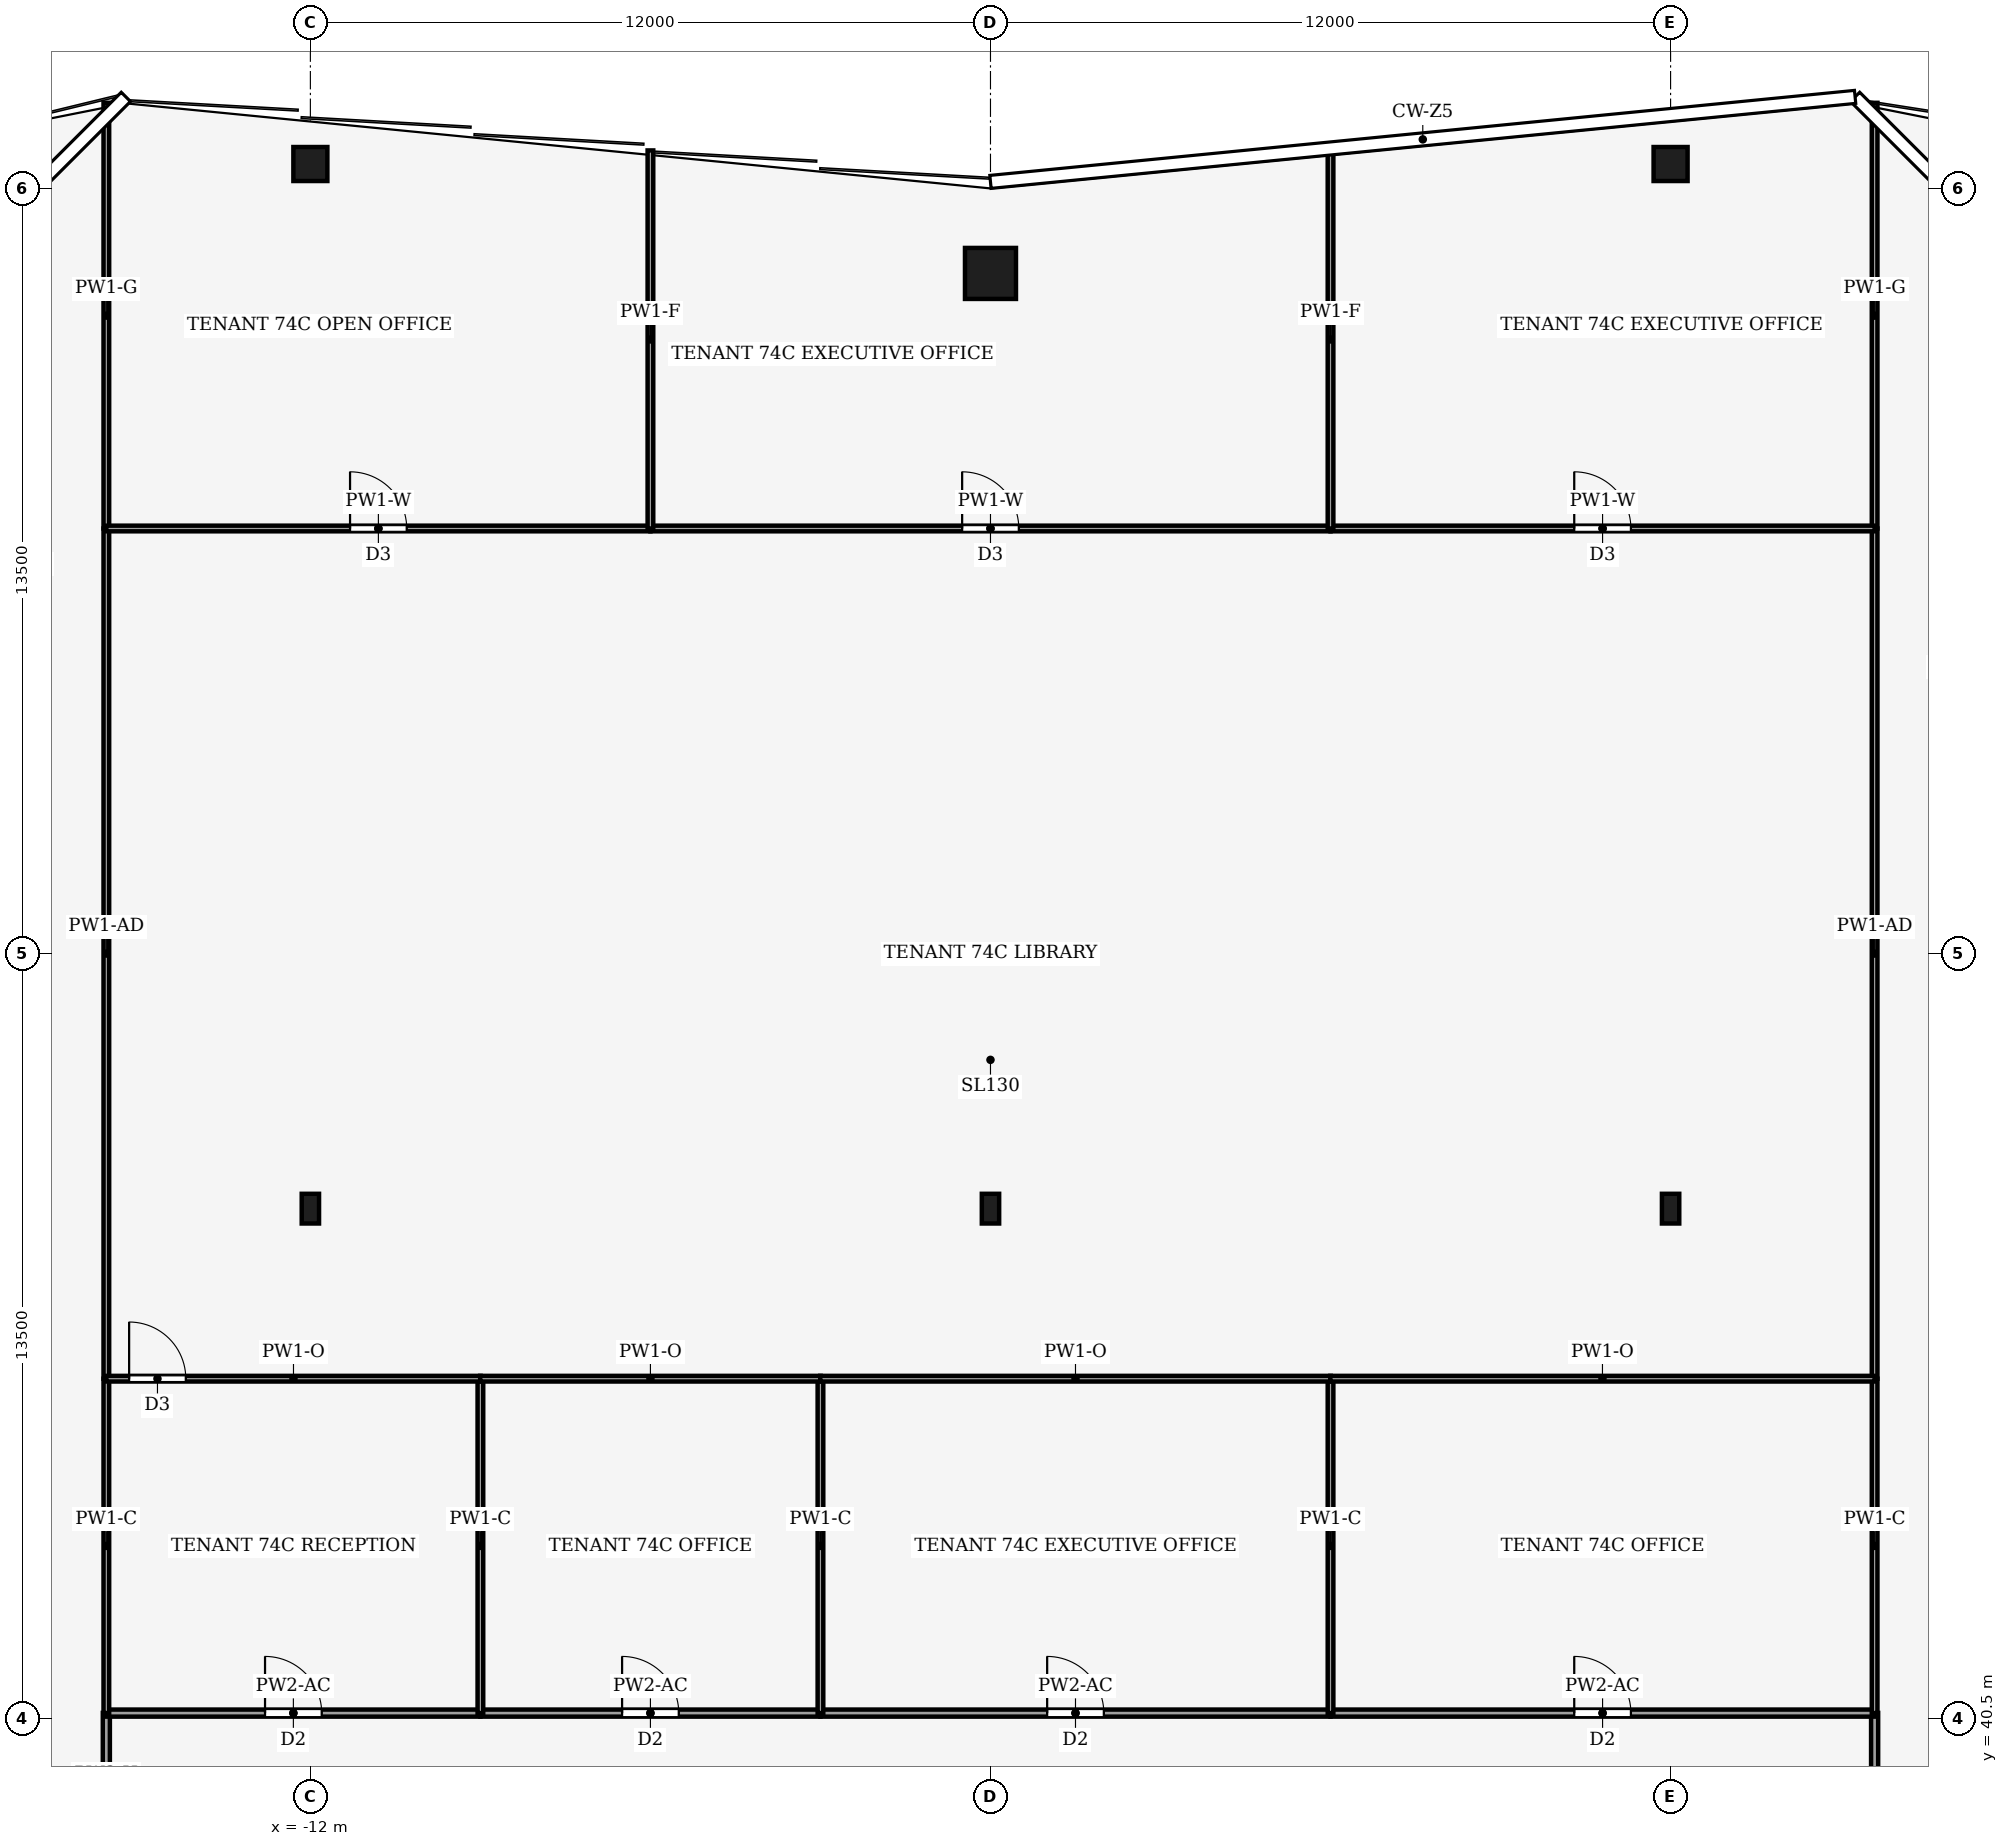
"""IFC4 building model, lengths in metres.
Left out: names, types, materials, properties, quantities, classifications, styles, units other than length and angle.
Written with IfcOpenShell. Run it as: python <this file> out.ifc"""

import sys

from ifc_helpers import new_model, si_unit, direction, frame, frame_2d, origin, origin_2d, place, context, subcontext, project, spatial, rectangle, hollow_rectangle, i_section, extrude, element, fill, save


model = new_model("IFC4")
c1 = context("Model", 3, precision=1e-05, world=origin(), true_north=direction((0.0, 1.0)))
c2 = subcontext(c1, "Body", "Model", "MODEL_VIEW")
j1 = project(units=[si_unit("LENGTHUNIT", "METRE"), si_unit("PLANEANGLEUNIT", "RADIAN")], contexts=[c1])
p1 = place(None, origin())
s1 = spatial("IfcSite", under=j1, at=p1, CompositionType="ELEMENT")
p2 = place(p1, origin())
s2 = spatial("IfcBuilding", under=s1, at=p2, CompositionType="ELEMENT")
p3 = place(p2, frame((0.0, 0.0, 322.0)))
s3 = spatial("IfcBuildingStorey", under=s2, at=p3, CompositionType="ELEMENT", Elevation=322.0)
p4 = place(p3, frame((0.0, 66.0, 0.0), z_axis=(0.0, 0.0, 1.0), x_axis=(1.0, 0.0, 0.0)))
e1 = element("IfcColumn", 1, at=p4, inside=s3, PredefinedType="COLUMN", context=c2, shape_type="SweptSolid", body=[
    extrude(hollow_rectangle(XDim=0.9, YDim=0.9, WallThickness=0.04, at=origin_2d()), origin(), (0.0, 0.0, 1.0), 4.0),
])
for number, where, z_axis, x_axis in (
    (2, (-12.0, 67.93, 0.0), (0.0, 0.0, 1.0), (1.0, 0.0, 0.0)),
    (3, (12.0, 67.93, 0.0), (0.0, 0.0, 1.0), (1.0, 0.0, 0.0)),
):
    element("IfcColumn", number, at=place(p3, frame(where, z_axis=z_axis, x_axis=x_axis)), inside=s3, PredefinedType="COLUMN", context=c2, shape_type="SweptSolid", body=[
        extrude(hollow_rectangle(XDim=0.6, YDim=0.6, WallThickness=0.025, at=origin_2d()), origin(), (0.0, 0.0, 1.0), 4.0),
    ])
for number, where, z_axis, x_axis in (
    (4, (-12.0, 49.5, 0.0), (0.0, 0.0, 1.0), (1.0, 0.0, 0.0)),
    (5, (0.0, 49.5, 0.0), (0.0, 0.0, 1.0), (1.0, 0.0, 0.0)),
    (6, (12.0, 49.5, 0.0), (0.0, 0.0, 1.0), (1.0, 0.0, 0.0)),
):
    element("IfcColumn", number, at=place(p3, frame(where, z_axis=z_axis, x_axis=x_axis)), inside=s3, PredefinedType="COLUMN", context=c2, shape_type="SweptSolid", body=[
        extrude(i_section(OverallWidth=0.306, OverallDepth=0.524, WebThickness=0.012, FlangeThickness=0.04, FilletRadius=0.027, at=origin_2d()), origin(), (0.0, 0.0, 1.0), 4.0),
    ])
p5 = place(p3, frame((-15.6, 37.5, 0.0), z_axis=(0.0, 0.0, 1.0), x_axis=(0.0, 1.0, 0.0)))
e7 = element("IfcWall", 7, at=p5, inside=s3, PredefinedType="PARTITIONING", context=c2, shape_type="SweptSolid", body=[
    extrude(rectangle(XDim=3.104, YDim=0.125, at=frame_2d((1.552, 0.0))), origin(), (0.0, 0.0, 1.0), 3.14),
])
p6 = place(p5, frame((0.252, 0.0, 0.0)))
e8 = element("IfcOpeningElement", 8, at=p6, cuts=e7, PredefinedType="OPENING", context=c2, shape_type="SweptSolid", body=[
    extrude(rectangle(XDim=1.0, YDim=2.1, at=frame_2d((0.5, 1.05))), frame((0.0, 0.073, 0.0), z_axis=(0.0, -1.0, 0.0), x_axis=(1.0, 0.0, 0.0)), (0.0, 0.0, 1.0), 0.145),
])
p7 = place(p3, frame((15.6, 40.604, 0.0), z_axis=(0.0, 0.0, 1.0), x_axis=(0.0, -1.0, 0.0)))
e9 = element("IfcWall", 9, at=p7, inside=s3, PredefinedType="PARTITIONING", context=c2, shape_type="SweptSolid", body=[
    extrude(rectangle(XDim=9.104, YDim=0.125, at=frame_2d((4.552, 0.0))), origin(), (0.0, 0.0, 1.0), 3.14),
])
p8 = place(p7, frame((4.052, 0.0, 0.0)))
e10 = element("IfcOpeningElement", 10, at=p8, cuts=e9, PredefinedType="OPENING", context=c2, shape_type="SweptSolid", body=[
    extrude(rectangle(XDim=1.0, YDim=2.1, at=frame_2d((0.5, 1.05))), frame((0.0, 0.073, 0.0), z_axis=(0.0, -1.0, 0.0), x_axis=(1.0, 0.0, 0.0)), (0.0, 0.0, 1.0), 0.145),
])
p9 = place(p3, frame((-15.6, 40.6, 0.0), z_axis=(0.0, 0.0, 1.0), x_axis=(1.0, 0.0, 0.0)))
e11 = element("IfcWall", 11, at=p9, inside=s3, PredefinedType="PARTITIONING", context=c2, shape_type="SweptSolid", body=[
    extrude(rectangle(XDim=6.6, YDim=0.125, at=frame_2d((3.3, 0.0))), origin(), (0.0, 0.0, 1.0), 3.39),
])
p10 = place(p9, frame((2.8, 0.0, 0.0)))
e12 = element("IfcOpeningElement", 12, at=p10, cuts=e11, PredefinedType="OPENING", context=c2, shape_type="SweptSolid", body=[
    extrude(rectangle(XDim=1.0, YDim=2.1, at=frame_2d((0.5, 1.05))), frame((0.0, 0.073, 0.0), z_axis=(0.0, -1.0, 0.0), x_axis=(1.0, 0.0, 0.0)), (0.0, 0.0, 1.0), 0.145),
])
p11 = place(p3, frame((-9.0, 40.6, 0.0), z_axis=(0.0, 0.0, 1.0), x_axis=(1.0, 0.0, 0.0)))
e13 = element("IfcWall", 13, at=p11, inside=s3, PredefinedType="PARTITIONING", context=c2, shape_type="SweptSolid", body=[
    extrude(rectangle(XDim=6.0, YDim=0.125, at=frame_2d((3.0, 0.0))), origin(), (0.0, 0.0, 1.0), 3.39),
])
p12 = place(p11, frame((2.5, 0.0, 0.0)))
e14 = element("IfcOpeningElement", 14, at=p12, cuts=e13, PredefinedType="OPENING", context=c2, shape_type="SweptSolid", body=[
    extrude(rectangle(XDim=1.0, YDim=2.1, at=frame_2d((0.5, 1.05))), frame((0.0, 0.073, 0.0), z_axis=(0.0, -1.0, 0.0), x_axis=(1.0, 0.0, 0.0)), (0.0, 0.0, 1.0), 0.145),
])
p13 = place(p3, frame((-3.0, 40.6, 0.0), z_axis=(0.0, 0.0, 1.0), x_axis=(1.0, 0.0, 0.0)))
e15 = element("IfcWall", 15, at=p13, inside=s3, PredefinedType="PARTITIONING", context=c2, shape_type="SweptSolid", body=[
    extrude(rectangle(XDim=9.0, YDim=0.125, at=frame_2d((4.5, 0.0))), origin(), (0.0, 0.0, 1.0), 3.39),
])
p14 = place(p13, frame((4.0, 0.0, 0.0)))
e16 = element("IfcOpeningElement", 16, at=p14, cuts=e15, PredefinedType="OPENING", context=c2, shape_type="SweptSolid", body=[
    extrude(rectangle(XDim=1.0, YDim=2.1, at=frame_2d((0.5, 1.05))), frame((0.0, 0.073, 0.0), z_axis=(0.0, -1.0, 0.0), x_axis=(1.0, 0.0, 0.0)), (0.0, 0.0, 1.0), 0.145),
])
p15 = place(p3, frame((6.0, 40.6, 0.0), z_axis=(0.0, 0.0, 1.0), x_axis=(1.0, 0.0, 0.0)))
e17 = element("IfcWall", 17, at=p15, inside=s3, PredefinedType="PARTITIONING", context=c2, shape_type="SweptSolid", body=[
    extrude(rectangle(XDim=9.6, YDim=0.125, at=frame_2d((4.8, 0.0))), origin(), (0.0, 0.0, 1.0), 3.39),
])
p16 = place(p15, frame((4.3, 0.0, 0.0)))
e18 = element("IfcOpeningElement", 18, at=p16, cuts=e17, PredefinedType="OPENING", context=c2, shape_type="SweptSolid", body=[
    extrude(rectangle(XDim=1.0, YDim=2.1, at=frame_2d((0.5, 1.05))), frame((0.0, 0.073, 0.0), z_axis=(0.0, -1.0, 0.0), x_axis=(1.0, 0.0, 0.0)), (0.0, 0.0, 1.0), 0.145),
])
p17 = place(p3, frame((-15.6, 40.6, 0.0), z_axis=(0.0, 0.0, 1.0), x_axis=(0.0, 1.0, 0.0)))
e19 = element("IfcWall", 19, at=p17, inside=s3, PredefinedType="PARTITIONING", context=c2, shape_type="SweptSolid", body=[
    extrude(rectangle(XDim=5.9, YDim=0.1, at=frame_2d((2.95, 0.0))), origin(), (0.0, 0.0, 1.0), 3.87),
])
p18 = place(p3, frame((-15.6, 46.5, 0.0), z_axis=(0.0, 0.0, 1.0), x_axis=(0.0, 1.0, 0.0)))
e20 = element("IfcWall", 20, at=p18, inside=s3, PredefinedType="PARTITIONING", context=c2, shape_type="SweptSolid", body=[
    extrude(rectangle(XDim=15.0, YDim=0.1, at=frame_2d((7.5, 0.0))), origin(), (0.0, 0.0, 1.0), 3.35),
])
p19 = place(p3, frame((-15.6, 61.5, 0.0), z_axis=(0.0, 0.0, 1.0), x_axis=(0.0, 1.0, 0.0)))
e21 = element("IfcWall", 21, at=p19, inside=s3, PredefinedType="PARTITIONING", context=c2, shape_type="SweptSolid", body=[
    extrude(rectangle(XDim=7.51, YDim=0.1, at=frame_2d((3.755, 0.0))), origin(), (0.0, 0.0, 1.0), 2.93),
])
p20 = place(p3, frame((15.6, 46.5, 0.0), z_axis=(0.0, 0.0, 1.0), x_axis=(0.0, -1.0, 0.0)))
e22 = element("IfcWall", 22, at=p20, inside=s3, PredefinedType="PARTITIONING", context=c2, shape_type="SweptSolid", body=[
    extrude(rectangle(XDim=5.9, YDim=0.1, at=frame_2d((2.95, 0.0))), origin(), (0.0, 0.0, 1.0), 3.87),
])
p21 = place(p3, frame((15.6, 61.5, 0.0), z_axis=(0.0, 0.0, 1.0), x_axis=(0.0, -1.0, 0.0)))
e23 = element("IfcWall", 23, at=p21, inside=s3, PredefinedType="PARTITIONING", context=c2, shape_type="SweptSolid", body=[
    extrude(rectangle(XDim=15.0, YDim=0.1, at=frame_2d((7.5, 0.0))), origin(), (0.0, 0.0, 1.0), 3.35),
])
p22 = place(p3, frame((15.6, 69.01, 0.0), z_axis=(0.0, 0.0, 1.0), x_axis=(0.0, -1.0, 0.0)))
e24 = element("IfcWall", 24, at=p22, inside=s3, PredefinedType="PARTITIONING", context=c2, shape_type="SweptSolid", body=[
    extrude(rectangle(XDim=7.51, YDim=0.1, at=frame_2d((3.755, 0.0))), origin(), (0.0, 0.0, 1.0), 2.93),
])
p23 = place(p3, frame((-9.0, 40.6, 0.0), z_axis=(0.0, 0.0, 1.0), x_axis=(0.0, 1.0, 0.0)))
e25 = element("IfcWall", 25, at=p23, inside=s3, PredefinedType="PARTITIONING", context=c2, shape_type="SweptSolid", body=[
    extrude(rectangle(XDim=5.9, YDim=0.1, at=frame_2d((2.95, 0.0))), origin(), (0.0, 0.0, 1.0), 3.87),
])
p24 = place(p3, frame((-15.6, 46.5, 0.0), z_axis=(0.0, 0.0, 1.0), x_axis=(1.0, 0.0, 0.0)))
e26 = element("IfcWall", 26, at=p24, inside=s3, PredefinedType="PARTITIONING", context=c2, shape_type="SweptSolid", body=[
    extrude(rectangle(XDim=6.604, YDim=0.1, at=frame_2d((3.302, 0.0))), origin(), (0.0, 0.0, 1.0), 3.39),
])
p25 = place(p24, frame((0.402, 0.0, 0.0)))
e27 = element("IfcOpeningElement", 27, at=p25, cuts=e26, PredefinedType="OPENING", context=c2, shape_type="SweptSolid", body=[
    extrude(rectangle(XDim=1.0, YDim=2.1, at=frame_2d((0.5, 1.05))), frame((0.0, 0.06, 0.0), z_axis=(0.0, -1.0, 0.0), x_axis=(1.0, 0.0, 0.0)), (0.0, 0.0, 1.0), 0.12),
])
p26 = place(p3, frame((-3.0, 40.6, 0.0), z_axis=(0.0, 0.0, 1.0), x_axis=(0.0, 1.0, 0.0)))
e28 = element("IfcWall", 28, at=p26, inside=s3, PredefinedType="PARTITIONING", context=c2, shape_type="SweptSolid", body=[
    extrude(rectangle(XDim=5.9, YDim=0.1, at=frame_2d((2.95, 0.0))), origin(), (0.0, 0.0, 1.0), 3.87),
])
p27 = place(p3, frame((-2.996, 46.5, 0.0), z_axis=(0.0, 0.0, 1.0), x_axis=(-1.0, 0.0, 0.0)))
e29 = element("IfcWall", 29, at=p27, inside=s3, PredefinedType="PARTITIONING", context=c2, shape_type="SweptSolid", body=[
    extrude(rectangle(XDim=6.008, YDim=0.1, at=frame_2d((3.004, 0.0))), origin(), (0.0, 0.0, 1.0), 3.39),
])
p28 = place(p3, frame((6.0, 40.6, 0.0), z_axis=(0.0, 0.0, 1.0), x_axis=(0.0, 1.0, 0.0)))
e30 = element("IfcWall", 30, at=p28, inside=s3, PredefinedType="PARTITIONING", context=c2, shape_type="SweptSolid", body=[
    extrude(rectangle(XDim=5.9, YDim=0.1, at=frame_2d((2.95, 0.0))), origin(), (0.0, 0.0, 1.0), 3.87),
])
p29 = place(p3, frame((6.004, 46.5, 0.0), z_axis=(0.0, 0.0, 1.0), x_axis=(-1.0, 0.0, 0.0)))
e31 = element("IfcWall", 31, at=p29, inside=s3, PredefinedType="PARTITIONING", context=c2, shape_type="SweptSolid", body=[
    extrude(rectangle(XDim=9.008, YDim=0.1, at=frame_2d((4.504, 0.0))), origin(), (0.0, 0.0, 1.0), 3.39),
])
p30 = place(p3, frame((15.6, 46.5, 0.0), z_axis=(0.0, 0.0, 1.0), x_axis=(-1.0, 0.0, 0.0)))
e32 = element("IfcWall", 32, at=p30, inside=s3, PredefinedType="PARTITIONING", context=c2, shape_type="SweptSolid", body=[
    extrude(rectangle(XDim=9.604, YDim=0.1, at=frame_2d((4.802, 0.0))), origin(), (0.0, 0.0, 1.0), 3.39),
])
p31 = place(p3, frame((-15.6, 61.5, 0.0), z_axis=(0.0, 0.0, 1.0), x_axis=(1.0, 0.0, 0.0)))
e33 = element("IfcWall", 33, at=p31, inside=s3, PredefinedType="PARTITIONING", context=c2, shape_type="SweptSolid", body=[
    extrude(rectangle(XDim=9.6, YDim=0.1, at=frame_2d((4.8, 0.0))), origin(), (0.0, 0.0, 1.0), 3.24),
])
p32 = place(p31, frame((4.3, 0.0, 0.0)))
e34 = element("IfcOpeningElement", 34, at=p32, cuts=e33, PredefinedType="OPENING", context=c2, shape_type="SweptSolid", body=[
    extrude(rectangle(XDim=1.0, YDim=2.1, at=frame_2d((0.5, 1.05))), frame((0.0, 0.06, 0.0), z_axis=(0.0, -1.0, 0.0), x_axis=(1.0, 0.0, 0.0)), (0.0, 0.0, 1.0), 0.12),
])
p33 = place(p3, frame((-6.0, 61.5, 0.0), z_axis=(0.0, 0.0, 1.0), x_axis=(1.0, 0.0, 0.0)))
e35 = element("IfcWall", 35, at=p33, inside=s3, PredefinedType="PARTITIONING", context=c2, shape_type="SweptSolid", body=[
    extrude(rectangle(XDim=12.0, YDim=0.1, at=frame_2d((6.0, 0.0))), origin(), (0.0, 0.0, 1.0), 3.24),
])
p34 = place(p33, frame((5.5, 0.0, 0.0)))
e36 = element("IfcOpeningElement", 36, at=p34, cuts=e35, PredefinedType="OPENING", context=c2, shape_type="SweptSolid", body=[
    extrude(rectangle(XDim=1.0, YDim=2.1, at=frame_2d((0.5, 1.05))), frame((0.0, 0.06, 0.0), z_axis=(0.0, -1.0, 0.0), x_axis=(1.0, 0.0, 0.0)), (0.0, 0.0, 1.0), 0.12),
])
p35 = place(p3, frame((6.0, 61.5, 0.0), z_axis=(0.0, 0.0, 1.0), x_axis=(1.0, 0.0, 0.0)))
e37 = element("IfcWall", 37, at=p35, inside=s3, PredefinedType="PARTITIONING", context=c2, shape_type="SweptSolid", body=[
    extrude(rectangle(XDim=9.6, YDim=0.1, at=frame_2d((4.8, 0.0))), origin(), (0.0, 0.0, 1.0), 3.24),
])
p36 = place(p35, frame((4.3, 0.0, 0.0)))
e38 = element("IfcOpeningElement", 38, at=p36, cuts=e37, PredefinedType="OPENING", context=c2, shape_type="SweptSolid", body=[
    extrude(rectangle(XDim=1.0, YDim=2.1, at=frame_2d((0.5, 1.05))), frame((0.0, 0.06, 0.0), z_axis=(0.0, -1.0, 0.0), x_axis=(1.0, 0.0, 0.0)), (0.0, 0.0, 1.0), 0.12),
])
for number, where, z_axis, x_axis in (
    (39, (-6.0, 61.5, 0.0), (0.0, 0.0, 1.0), (0.0, 1.0, 0.0)),
    (40, (6.0, 61.5, 0.0), (0.0, 0.0, 1.0), (0.0, 1.0, 0.0)),
):
    element("IfcWall", number, at=place(p3, frame(where, z_axis=z_axis, x_axis=x_axis)), inside=s3, PredefinedType="PARTITIONING", context=c2, shape_type="SweptSolid", body=[
        extrude(rectangle(XDim=6.67, YDim=0.1, at=frame_2d((3.335, 0.0))), origin(), (0.0, 0.0, 1.0), 3.04),
    ])
p37 = place(p10, origin())
e41 = element("IfcDoor", 41, at=p37, inside=s3, OperationType="SINGLE_SWING_RIGHT", PredefinedType="DOOR", context=c2, shape_type="SweptSolid", body=[
    extrude(rectangle(XDim=1.0, YDim=2.1, at=frame_2d((0.5, 1.05))), frame((0.0, 0.025, 0.0), z_axis=(0.0, -1.0, 0.0), x_axis=(1.0, 0.0, 0.0)), (0.0, 0.0, 1.0), 0.05),
])
fill(e12, e41)
p38 = place(p12, origin())
e42 = element("IfcDoor", 42, at=p38, inside=s3, OperationType="SINGLE_SWING_LEFT", PredefinedType="DOOR", context=c2, shape_type="SweptSolid", body=[
    extrude(rectangle(XDim=1.0, YDim=2.1, at=frame_2d((0.5, 1.05))), frame((0.0, 0.025, 0.0), z_axis=(0.0, -1.0, 0.0), x_axis=(1.0, 0.0, 0.0)), (0.0, 0.0, 1.0), 0.05),
])
fill(e14, e42)
p39 = place(p14, origin())
e43 = element("IfcDoor", 43, at=p39, inside=s3, OperationType="SINGLE_SWING_RIGHT", PredefinedType="DOOR", context=c2, shape_type="SweptSolid", body=[
    extrude(rectangle(XDim=1.0, YDim=2.1, at=frame_2d((0.5, 1.05))), frame((0.0, 0.025, 0.0), z_axis=(0.0, -1.0, 0.0), x_axis=(1.0, 0.0, 0.0)), (0.0, 0.0, 1.0), 0.05),
])
fill(e16, e43)
p40 = place(p16, origin())
e44 = element("IfcDoor", 44, at=p40, inside=s3, OperationType="SINGLE_SWING_LEFT", PredefinedType="DOOR", context=c2, shape_type="SweptSolid", body=[
    extrude(rectangle(XDim=1.0, YDim=2.1, at=frame_2d((0.5, 1.05))), frame((0.0, 0.025, 0.0), z_axis=(0.0, -1.0, 0.0), x_axis=(1.0, 0.0, 0.0)), (0.0, 0.0, 1.0), 0.05),
])
fill(e18, e44)
p41 = place(p25, origin())
e45 = element("IfcDoor", 45, at=p41, inside=s3, OperationType="SINGLE_SWING_LEFT", PredefinedType="DOOR", context=c2, shape_type="SweptSolid", body=[
    extrude(rectangle(XDim=1.0, YDim=2.1, at=frame_2d((0.5, 1.05))), frame((0.0, 0.025, 0.0), z_axis=(0.0, -1.0, 0.0), x_axis=(1.0, 0.0, 0.0)), (0.0, 0.0, 1.0), 0.05),
])
fill(e27, e45)
p42 = place(p32, origin())
e46 = element("IfcDoor", 46, at=p42, inside=s3, OperationType="SINGLE_SWING_LEFT", PredefinedType="DOOR", context=c2, shape_type="SweptSolid", body=[
    extrude(rectangle(XDim=1.0, YDim=2.1, at=frame_2d((0.5, 1.05))), frame((0.0, 0.025, 0.0), z_axis=(0.0, -1.0, 0.0), x_axis=(1.0, 0.0, 0.0)), (0.0, 0.0, 1.0), 0.05),
])
fill(e34, e46)
p43 = place(p34, origin())
e47 = element("IfcDoor", 47, at=p43, inside=s3, OperationType="SINGLE_SWING_RIGHT", PredefinedType="DOOR", context=c2, shape_type="SweptSolid", body=[
    extrude(rectangle(XDim=1.0, YDim=2.1, at=frame_2d((0.5, 1.05))), frame((0.0, 0.025, 0.0), z_axis=(0.0, -1.0, 0.0), x_axis=(1.0, 0.0, 0.0)), (0.0, 0.0, 1.0), 0.05),
])
fill(e36, e47)
p44 = place(p36, origin())
e48 = element("IfcDoor", 48, at=p44, inside=s3, OperationType="SINGLE_SWING_LEFT", PredefinedType="DOOR", context=c2, shape_type="SweptSolid", body=[
    extrude(rectangle(XDim=1.0, YDim=2.1, at=frame_2d((0.5, 1.05))), frame((0.0, 0.025, 0.0), z_axis=(0.0, -1.0, 0.0), x_axis=(1.0, 0.0, 0.0)), (0.0, 0.0, 1.0), 0.05),
])
fill(e38, e48)
save(model, sys.argv[1])
